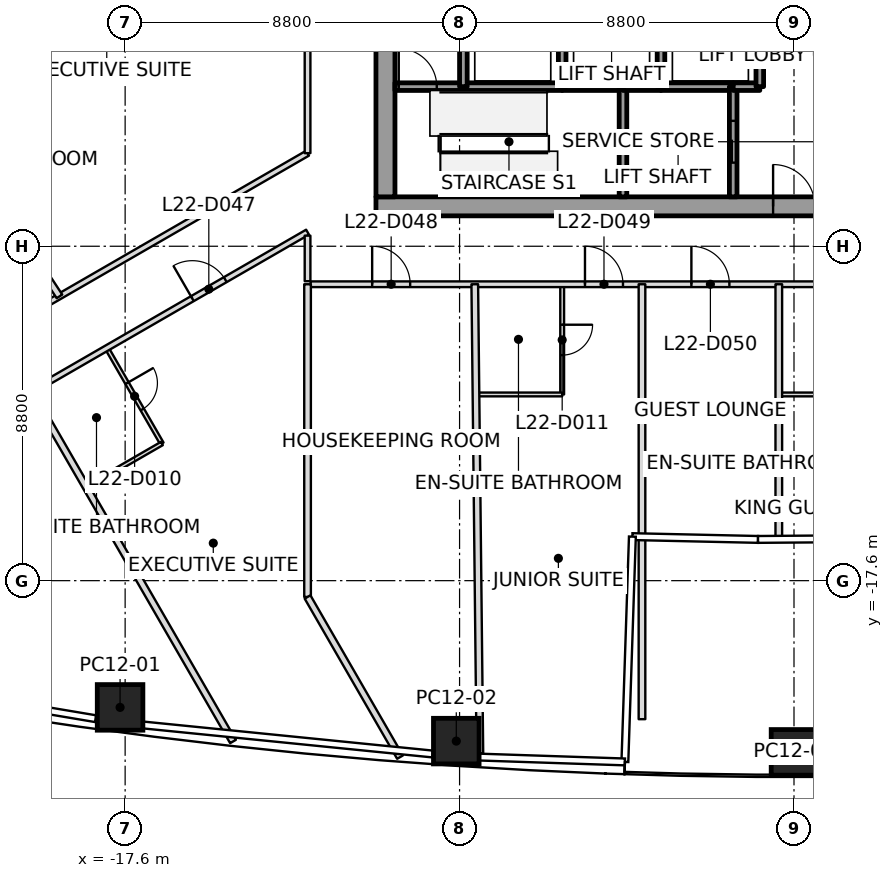
"""IFC4 building model, lengths in metres.
Left out: names, types, materials, properties, quantities, classifications, styles, units other than length and angle.
Written with IfcOpenShell. Run it as: python <this file> out.ifc"""

import sys

from ifc_helpers import new_model, si_unit, direction, frame, frame_2d, origin, origin_2d, place, context, subcontext, project, spatial, rectangle, extrude, clip, halfspace, element, fill, save


model = new_model("IFC4")
c1 = context("Model", 3, precision=1e-05, world=origin(), true_north=direction((0.0, 1.0)))
c2 = subcontext(c1, "Body", "Model", "MODEL_VIEW")
j1 = project(units=[si_unit("LENGTHUNIT", "METRE"), si_unit("PLANEANGLEUNIT", "RADIAN")], contexts=[c1])
p1 = place(None, origin())
s1 = spatial("IfcSite", under=j1, at=p1, CompositionType="ELEMENT")
p2 = place(p1, origin())
s2 = spatial("IfcBuilding", under=s1, at=p2, CompositionType="ELEMENT")
p3 = place(p2, frame((0.0, 0.0, 103.5)))
s3 = spatial("IfcBuildingStorey", under=s2, at=p3, CompositionType="ELEMENT", Elevation=103.5)
p4 = place(p3, frame((-17.733, -20.935, 0.0), z_axis=(0.01919682326, 0.011280607483, 0.999752084205), x_axis=(-0.990948907943, 0.133090565371, 0.017526073608)))
e1 = element("IfcColumn", 1, at=p4, inside=s3, PredefinedType="COLUMN", context=c2, shape_type="SweptSolid", body=[
    clip(extrude(rectangle(XDim=1.2, YDim=1.2, at=origin_2d()), origin(), (0.0, 0.0, 1.0), 3.701), halfspace(frame((0.0, 0.0, 3.698)), False)),
])
p5 = place(p3, frame((-8.886, -21.823, 0.0), z_axis=(0.00963262733, 0.012139749512, 0.999879912276), x_axis=(-0.997734074202, 0.066702624649, 0.008802104381)))
e2 = element("IfcColumn", 2, at=p5, inside=s3, PredefinedType="COLUMN", context=c2, shape_type="SweptSolid", body=[
    clip(extrude(rectangle(XDim=1.2, YDim=1.2, at=origin_2d()), origin(), (0.0, 0.0, 1.0), 3.7), halfspace(frame((0.0, 0.0, 3.698)), False)),
])
p6 = place(p3, frame((0.0, -22.119, 0.0), z_axis=(0.0, 0.012338222751, 0.999923881233), x_axis=(1.0, 0.0, 0.0)))
e3 = element("IfcColumn", 3, at=p6, inside=s3, PredefinedType="COLUMN", context=c2, shape_type="SweptSolid", body=[
    clip(extrude(rectangle(XDim=1.2, YDim=1.2, at=origin_2d()), origin(), (0.0, 0.0, 1.0), 3.7), halfspace(frame((0.0, 0.0, 3.699)), False)),
])
p7 = place(p3, frame((-11.0, -7.75, 0.0), z_axis=(0.0, 0.0, 1.0), x_axis=(1.0, 0.0, 0.0)))
e4 = element("IfcWall", 4, at=p7, inside=s3, PredefinedType="SHEAR", context=c2, shape_type="SweptSolid", body=[
    extrude(rectangle(XDim=22.0, YDim=0.5, at=frame_2d((11.0, 0.0))), origin(), (0.0, 0.0, 1.0), 3.7),
])
p8 = place(p7, frame((10.45, 0.0, 0.0)))
e5 = element("IfcOpeningElement", 5, at=p8, cuts=e4, PredefinedType="OPENING", context=c2, shape_type="SweptSolid", body=[
    extrude(rectangle(XDim=1.1, YDim=2.1, at=frame_2d((0.55, 1.05))), frame((0.0, 0.25, 0.0), z_axis=(0.0, -1.0, 0.0), x_axis=(1.0, 0.0, 0.0)), (0.0, 0.0, 1.0), 0.5),
])
p9 = place(p3, frame((-10.75, -7.5, 0.0), z_axis=(0.0, 0.0, 1.0), x_axis=(0.0, 1.0, 0.0)))
e6 = element("IfcWall", 6, at=p9, inside=s3, PredefinedType="SHEAR", context=c2, shape_type="SweptSolid", body=[
    extrude(rectangle(XDim=15.0, YDim=0.5, at=frame_2d((7.5, 0.0))), origin(), (0.0, 0.0, 1.0), 3.7),
])
p10 = place(p9, frame((6.6, 0.0, 0.0)))
e7 = element("IfcOpeningElement", 7, at=p10, cuts=e6, PredefinedType="OPENING", context=c2, shape_type="SweptSolid", body=[
    extrude(rectangle(XDim=1.8, YDim=2.1, at=frame_2d((0.9, 1.05))), frame((0.0, 0.25, 0.0), z_axis=(0.0, -1.0, 0.0), x_axis=(1.0, 0.0, 0.0)), (0.0, 0.0, 1.0), 0.5),
])
p11 = place(p3, frame((-10.5, -4.6, 0.0), z_axis=(0.0, 0.0, 1.0), x_axis=(1.0, 0.0, 0.0)))
e8 = element("IfcWall", 8, at=p11, inside=s3, PredefinedType="SOLIDWALL", context=c2, shape_type="SweptSolid", body=[
    extrude(rectangle(XDim=1.8, YDim=0.2, at=frame_2d((0.9, 0.0))), origin(), (0.0, 0.0, 1.0), 3.55),
])
p12 = place(p11, frame((0.1, 0.0, 0.0)))
e9 = element("IfcOpeningElement", 9, at=p12, cuts=e8, PredefinedType="OPENING", context=c2, shape_type="SweptSolid", body=[
    extrude(rectangle(XDim=1.0, YDim=2.1, at=frame_2d((0.5, 1.05))), frame((0.0, 0.1, 0.0), z_axis=(0.0, -1.0, 0.0), x_axis=(1.0, 0.0, 0.0)), (0.0, 0.0, 1.0), 0.2),
])
p13 = place(p3, frame((-8.7, -4.6, 0.0), z_axis=(0.0, 0.0, 1.0), x_axis=(1.0, 0.0, 0.0)))
e10 = element("IfcWall", 10, at=p13, inside=s3, PredefinedType="SOLIDWALL", context=c2, shape_type="SweptSolid", body=[
    extrude(rectangle(XDim=2.6, YDim=0.2, at=frame_2d((1.3, 0.0))), origin(), (0.0, 0.0, 1.0), 3.55),
])
p14 = place(p3, frame((-8.7, -4.6, 0.0), z_axis=(0.0, 0.0, 1.0), x_axis=(0.0, 1.0, 0.0)))
e11 = element("IfcWall", 11, at=p14, inside=s3, PredefinedType="SOLIDWALL", context=c2, shape_type="SweptSolid", body=[
    extrude(rectangle(XDim=2.8, YDim=0.2, at=frame_2d((1.4, 0.0))), origin(), (0.0, 0.0, 1.0), 3.55),
])
p15 = place(p3, frame((-6.1, -4.6, 0.0), z_axis=(0.0, 0.0, 1.0), x_axis=(1.0, 0.0, 0.0)))
e12 = element("IfcWall", 12, at=p15, inside=s3, PredefinedType="SOLIDWALL", context=c2, shape_type="SweptSolid", body=[
    extrude(rectangle(XDim=1.6, YDim=0.2, at=frame_2d((0.8, 0.0))), origin(), (0.0, 0.0, 1.0), 3.55),
])
p16 = place(p3, frame((-6.1, -4.6, 0.0), z_axis=(0.0, 0.0, 1.0), x_axis=(0.0, 1.0, 0.0)))
e13 = element("IfcWall", 13, at=p16, inside=s3, PredefinedType="SOLIDWALL", context=c2, shape_type="SweptSolid", body=[
    extrude(rectangle(XDim=2.8, YDim=0.2, at=frame_2d((1.4, 0.0))), origin(), (0.0, 0.0, 1.0), 3.55),
])
p17 = place(p3, frame((-4.5, -4.6, 0.0), z_axis=(0.0, 0.0, 1.0), x_axis=(0.0, -1.0, 0.0)))
e14 = element("IfcWall", 14, at=p17, inside=s3, PredefinedType="SOLIDWALL", context=c2, shape_type="SweptSolid", body=[
    extrude(rectangle(XDim=2.9, YDim=0.2, at=frame_2d((1.45, 0.0))), origin(), (0.0, 0.0, 1.0), 3.55),
])
p18 = place(p3, frame((-4.5, -4.6, 0.0), z_axis=(0.0, 0.0, 1.0), x_axis=(1.0, 0.0, 0.0)))
e15 = element("IfcWall", 15, at=p18, inside=s3, PredefinedType="SOLIDWALL", context=c2, shape_type="SweptSolid", body=[
    extrude(rectangle(XDim=1.0, YDim=0.2, at=frame_2d((0.5, 0.0))), origin(), (0.0, 0.0, 1.0), 3.55),
])
p19 = place(p3, frame((-3.5, -4.6, 0.0), z_axis=(0.0, 0.0, 1.0), x_axis=(1.0, 0.0, 0.0)))
e16 = element("IfcWall", 16, at=p19, inside=s3, PredefinedType="SOLIDWALL", context=c2, shape_type="SweptSolid", body=[
    extrude(rectangle(XDim=1.9, YDim=0.2, at=frame_2d((0.95, 0.0))), origin(), (0.0, 0.0, 1.0), 3.55),
])
p20 = place(p3, frame((-3.5, -4.6, 0.0), z_axis=(0.0, 0.0, 1.0), x_axis=(0.0, 1.0, 0.0)))
e17 = element("IfcWall", 17, at=p20, inside=s3, PredefinedType="SOLIDWALL", context=c2, shape_type="SweptSolid", body=[
    extrude(rectangle(XDim=2.8, YDim=0.2, at=frame_2d((1.4, 0.0))), origin(), (0.0, 0.0, 1.0), 3.55),
])
p21 = place(p3, frame((-1.6, -7.5, 0.0), z_axis=(0.0, 0.0, 1.0), x_axis=(0.0, 1.0, 0.0)))
e18 = element("IfcWall", 18, at=p21, inside=s3, PredefinedType="SOLIDWALL", context=c2, shape_type="SweptSolid", body=[
    extrude(rectangle(XDim=2.9, YDim=0.2, at=frame_2d((1.45, 0.0))), origin(), (0.0, 0.0, 1.0), 3.55),
])
p22 = place(p21, frame((0.9, 0.0, 0.0)))
e19 = element("IfcOpeningElement", 19, at=p22, cuts=e18, PredefinedType="OPENING", context=c2, shape_type="SweptSolid", body=[
    extrude(rectangle(XDim=1.1, YDim=2.1, at=frame_2d((0.55, 1.05))), frame((0.0, 0.1, 0.0), z_axis=(0.0, -1.0, 0.0), x_axis=(1.0, 0.0, 0.0)), (0.0, 0.0, 1.0), 0.2),
])
p23 = place(p3, frame((-1.6, -4.6, 0.0), z_axis=(0.0, 0.0, 1.0), x_axis=(1.0, 0.0, 0.0)))
e20 = element("IfcWall", 20, at=p23, inside=s3, PredefinedType="SOLIDWALL", context=c2, shape_type="SweptSolid", body=[
    extrude(rectangle(XDim=0.7, YDim=0.2, at=frame_2d((0.35, 0.0))), origin(), (0.0, 0.0, 1.0), 3.55),
])
p24 = place(p3, frame((-0.9, -4.6, 0.0), z_axis=(0.0, 0.0, 1.0), x_axis=(0.0, 1.0, 0.0)))
e21 = element("IfcWall", 21, at=p24, inside=s3, PredefinedType="SOLIDWALL", context=c2, shape_type="SweptSolid", body=[
    extrude(rectangle(XDim=2.8, YDim=0.2, at=frame_2d((1.4, 0.0))), origin(), (0.0, 0.0, 1.0), 3.55),
])
p25 = place(p3, frame((-19.328, -10.12, 0.0), z_axis=(0.0, 0.0, 1.0), x_axis=(-0.548041487863, 0.836451150744, 0.0)))
e22 = element("IfcWall", 22, at=p25, inside=s3, PredefinedType="PARTITIONING", context=c2, shape_type="SweptSolid", body=[
    extrude(rectangle(XDim=11.215, YDim=0.175, at=frame_2d((5.608, 0.0))), origin(), (0.0, 0.0, 1.0), 2.934),
])
p26 = place(p3, frame((-14.761, -21.832, 0.0), z_axis=(0.0, 0.0, 1.0), x_axis=(-0.500013467546, 0.866017628154, 0.0)))
e23 = element("IfcWall", 23, at=p26, inside=s3, PredefinedType="PARTITIONING", context=c2, shape_type="SweptSolid", body=[
    extrude(rectangle(XDim=10.627, YDim=0.175, at=frame_2d((5.313, 0.0))), origin(), (0.0, 0.0, 1.0), 2.934),
])
p27 = place(p3, frame((-12.8, -9.8, 0.0), z_axis=(0.0, 0.0, 1.0), x_axis=(0.0, -1.0, 0.0)))
e24 = element("IfcWall", 24, at=p27, inside=s3, PredefinedType="PARTITIONING", context=c2, shape_type="SweptSolid", body=[
    extrude(rectangle(XDim=8.229, YDim=0.175, at=frame_2d((4.115, 0.0))), origin(), (0.0, 0.0, 1.0), 3.15),
])
p28 = place(p3, frame((-12.8, -18.029, 0.0), z_axis=(0.0, 0.0, 1.0), x_axis=(0.500007611576, -0.866021009194, 0.0)))
e25 = element("IfcWall", 25, at=p28, inside=s3, PredefinedType="PARTITIONING", context=c2, shape_type="SweptSolid", body=[
    extrude(rectangle(XDim=4.867, YDim=0.175, at=frame_2d((2.433, 0.0))), origin(), (0.0, 0.0, 1.0), 2.934),
])
p29 = place(p3, frame((-8.265, -22.143, 0.0), z_axis=(0.0, 0.0, 1.0), x_axis=(-0.010897942505, 0.999940615661, 0.0)))
e26 = element("IfcWall", 26, at=p29, inside=s3, PredefinedType="PARTITIONING", context=c2, shape_type="SweptSolid", body=[
    extrude(rectangle(XDim=12.344, YDim=0.175, at=frame_2d((6.172, 0.0))), origin(), (0.0, 0.0, 1.0), 2.934),
])
p30 = place(p3, frame((-4.0, -9.8, 0.0), z_axis=(0.0, 0.0, 1.0), x_axis=(0.0, -1.0, 0.0)))
e27 = element("IfcWall", 27, at=p30, inside=s3, PredefinedType="PARTITIONING", context=c2, shape_type="SweptSolid", body=[
    extrude(rectangle(XDim=11.445, YDim=0.175, at=frame_2d((5.723, 0.0))), origin(), (0.0, 0.0, 1.0), 3.15),
])
p31 = place(p3, frame((-0.4, -16.515, 0.0), z_axis=(0.0, 0.0, 1.0), x_axis=(0.0, 1.0, 0.0)))
e28 = element("IfcWall", 28, at=p31, inside=s3, PredefinedType="PARTITIONING", context=c2, shape_type="SweptSolid", body=[
    extrude(rectangle(XDim=6.715, YDim=0.175, at=frame_2d((3.357, 0.0))), origin(), (0.0, 0.0, 1.0), 3.15),
])
p32 = place(p3, frame((-12.8, -6.351, 0.0), z_axis=(0.0, 0.0, 1.0), x_axis=(-0.866023496323, -0.500003303805, 0.0)))
e29 = element("IfcWall", 29, at=p32, inside=s3, PredefinedType="PARTITIONING", context=c2, shape_type="SweptSolid", body=[
    extrude(rectangle(XDim=11.538, YDim=0.15, at=frame_2d((5.769, 0.0))), origin(), (0.0, 0.0, 1.0), 2.947),
])
p33 = place(p32, frame((10.238, 0.0, 0.0)))
e30 = element("IfcOpeningElement", 30, at=p33, cuts=e29, PredefinedType="OPENING", context=c2, shape_type="SweptSolid", body=[
    extrude(rectangle(XDim=1.0, YDim=2.1, at=frame_2d((0.5, 1.05))), frame((0.0, 0.075, 0.0), z_axis=(0.0, -1.0, 0.0), x_axis=(1.0, 0.0, 0.0)), (0.0, 0.0, 1.0), 0.15),
])
p34 = place(p3, frame((-21.823, -13.639, 0.0), z_axis=(0.0, 0.0, 1.0), x_axis=(0.86602247392, 0.500005074639, 0.0)))
e31 = element("IfcWall", 31, at=p34, inside=s3, PredefinedType="PARTITIONING", context=c2, shape_type="SweptSolid", body=[
    extrude(rectangle(XDim=10.419, YDim=0.15, at=frame_2d((5.209, 0.0))), origin(), (0.0, 0.0, 1.0), 2.797),
])
p35 = place(p34, frame((0.459, 0.0, 0.0)))
e32 = element("IfcOpeningElement", 32, at=p35, cuts=e31, PredefinedType="OPENING", context=c2, shape_type="SweptSolid", body=[
    extrude(rectangle(XDim=1.0, YDim=2.1, at=frame_2d((0.5, 1.05))), frame((0.0, 0.075, 0.0), z_axis=(0.0, -1.0, 0.0), x_axis=(1.0, 0.0, 0.0)), (0.0, 0.0, 1.0), 0.15),
])
p36 = place(p34, frame((6.919, 0.0, 0.0)))
e33 = element("IfcOpeningElement", 33, at=p36, cuts=e31, PredefinedType="OPENING", context=c2, shape_type="SweptSolid", body=[
    extrude(rectangle(XDim=1.0, YDim=2.1, at=frame_2d((0.5, 1.05))), frame((0.0, 0.075, 0.0), z_axis=(0.0, -1.0, 0.0), x_axis=(1.0, 0.0, 0.0)), (0.0, 0.0, 1.0), 0.15),
])
p37 = place(p3, frame((-12.8, -8.521, 0.0), z_axis=(0.0, 0.0, 1.0), x_axis=(0.0, -1.0, 0.0)))
e34 = element("IfcWall", 34, at=p37, inside=s3, PredefinedType="PARTITIONING", context=c2, shape_type="SweptSolid", body=[
    extrude(rectangle(XDim=1.199, YDim=0.15, at=frame_2d((0.6, 0.0))), origin(), (0.0, 0.0, 1.0), 2.797),
])
p38 = place(p3, frame((-12.8, 9.72, 0.0), z_axis=(0.0, 0.0, 1.0), x_axis=(0.0, -1.0, 0.0)))
e35 = element("IfcWall", 35, at=p38, inside=s3, PredefinedType="PARTITIONING", context=c2, shape_type="SweptSolid", body=[
    extrude(rectangle(XDim=16.071, YDim=0.15, at=frame_2d((8.035, 0.0))), origin(), (0.0, 0.0, 1.0), 2.947),
])
p39 = place(p38, frame((3.095, 0.0, 0.0)))
e36 = element("IfcOpeningElement", 36, at=p39, cuts=e35, PredefinedType="OPENING", context=c2, shape_type="SweptSolid", body=[
    extrude(rectangle(XDim=1.0, YDim=2.1, at=frame_2d((0.5, 1.05))), frame((0.0, 0.075, 0.0), z_axis=(0.0, -1.0, 0.0), x_axis=(1.0, 0.0, 0.0)), (0.0, 0.0, 1.0), 0.15),
])
p40 = place(p38, frame((12.371, 0.0, 0.0)))
e37 = element("IfcOpeningElement", 37, at=p40, cuts=e35, PredefinedType="OPENING", context=c2, shape_type="SweptSolid", body=[
    extrude(rectangle(XDim=1.0, YDim=2.1, at=frame_2d((0.5, 1.05))), frame((0.0, 0.075, 0.0), z_axis=(0.0, -1.0, 0.0), x_axis=(1.0, 0.0, 0.0)), (0.0, 0.0, 1.0), 0.15),
])
p41 = place(p3, frame((-12.72, -9.8, 0.0), z_axis=(0.0, 0.0, 1.0), x_axis=(1.0, 0.0, 0.0)))
e38 = element("IfcWall", 38, at=p41, inside=s3, PredefinedType="PARTITIONING", context=c2, shape_type="SweptSolid", body=[
    extrude(rectangle(XDim=25.44, YDim=0.15, at=frame_2d((12.72, 0.0))), origin(), (0.0, 0.0, 1.0), 3.017),
])
p42 = place(p41, frame((1.62, 0.0, 0.0)))
e39 = element("IfcOpeningElement", 39, at=p42, cuts=e38, PredefinedType="OPENING", context=c2, shape_type="SweptSolid", body=[
    extrude(rectangle(XDim=1.0, YDim=2.1, at=frame_2d((0.5, 1.05))), frame((0.0, 0.075, 0.0), z_axis=(0.0, -1.0, 0.0), x_axis=(1.0, 0.0, 0.0)), (0.0, 0.0, 1.0), 0.15),
])
p43 = place(p41, frame((7.22, 0.0, 0.0)))
e40 = element("IfcOpeningElement", 40, at=p43, cuts=e38, PredefinedType="OPENING", context=c2, shape_type="SweptSolid", body=[
    extrude(rectangle(XDim=1.0, YDim=2.1, at=frame_2d((0.5, 1.05))), frame((0.0, 0.075, 0.0), z_axis=(0.0, -1.0, 0.0), x_axis=(1.0, 0.0, 0.0)), (0.0, 0.0, 1.0), 0.15),
])
p44 = place(p41, frame((10.02, 0.0, 0.0)))
e41 = element("IfcOpeningElement", 41, at=p44, cuts=e38, PredefinedType="OPENING", context=c2, shape_type="SweptSolid", body=[
    extrude(rectangle(XDim=1.0, YDim=2.1, at=frame_2d((0.5, 1.05))), frame((0.0, 0.075, 0.0), z_axis=(0.0, -1.0, 0.0), x_axis=(1.0, 0.0, 0.0)), (0.0, 0.0, 1.0), 0.15),
])
p45 = place(p41, frame((15.42, 0.0, 0.0)))
e42 = element("IfcOpeningElement", 42, at=p45, cuts=e38, PredefinedType="OPENING", context=c2, shape_type="SweptSolid", body=[
    extrude(rectangle(XDim=1.0, YDim=2.1, at=frame_2d((0.5, 1.05))), frame((0.0, 0.075, 0.0), z_axis=(0.0, -1.0, 0.0), x_axis=(1.0, 0.0, 0.0)), (0.0, 0.0, 1.0), 0.15),
])
p46 = place(p41, frame((19.82, 0.0, 0.0)))
e43 = element("IfcOpeningElement", 43, at=p46, cuts=e38, PredefinedType="OPENING", context=c2, shape_type="SweptSolid", body=[
    extrude(rectangle(XDim=1.0, YDim=2.1, at=frame_2d((0.5, 1.05))), frame((0.0, 0.075, 0.0), z_axis=(0.0, -1.0, 0.0), x_axis=(1.0, 0.0, 0.0)), (0.0, 0.0, 1.0), 0.15),
])
p47 = place(p3, frame((-18.068, -11.505, 0.0), z_axis=(0.0, 0.0, 1.0), x_axis=(0.500036638401, -0.866004249561, 0.0)))
e44 = element("IfcWall", 44, at=p47, inside=s3, PredefinedType="PARTITIONING", context=c2, shape_type="SweptSolid", body=[
    extrude(rectangle(XDim=2.87, YDim=0.1, at=frame_2d((1.435, 0.0))), origin(), (0.0, 0.0, 1.0), 2.797),
])
p48 = place(p47, frame((1.035, 0.0, 0.0)))
e45 = element("IfcOpeningElement", 45, at=p48, cuts=e44, PredefinedType="OPENING", context=c2, shape_type="SweptSolid", body=[
    extrude(rectangle(XDim=0.8, YDim=2.1, at=frame_2d((0.4, 1.05))), frame((0.0, 0.05, 0.0), z_axis=(0.0, -1.0, 0.0), x_axis=(1.0, 0.0, 0.0)), (0.0, 0.0, 1.0), 0.1),
])
p49 = place(p3, frame((-16.633, -13.991, 0.0), z_axis=(0.0, 0.0, 1.0), x_axis=(-0.866017224141, -0.500014167291, 0.0)))
e46 = element("IfcWall", 46, at=p49, inside=s3, PredefinedType="PARTITIONING", context=c2, shape_type="SweptSolid", body=[
    extrude(rectangle(XDim=2.27, YDim=0.1, at=frame_2d((1.135, 0.0))), origin(), (0.0, 0.0, 1.0), 3.15),
])
p50 = place(p3, frame((-6.1, -9.83, 0.0), z_axis=(0.0, 0.0, 1.0), x_axis=(0.0, -1.0, 0.0)))
e47 = element("IfcWall", 47, at=p50, inside=s3, PredefinedType="PARTITIONING", context=c2, shape_type="SweptSolid", body=[
    extrude(rectangle(XDim=2.87, YDim=0.1, at=frame_2d((1.435, 0.0))), origin(), (0.0, 0.0, 1.0), 3.15),
])
p51 = place(p50, frame((1.035, 0.0, 0.0)))
e48 = element("IfcOpeningElement", 48, at=p51, cuts=e47, PredefinedType="OPENING", context=c2, shape_type="SweptSolid", body=[
    extrude(rectangle(XDim=0.8, YDim=2.1, at=frame_2d((0.4, 1.05))), frame((0.0, 0.05, 0.0), z_axis=(0.0, -1.0, 0.0), x_axis=(1.0, 0.0, 0.0)), (0.0, 0.0, 1.0), 0.1),
])
p52 = place(p3, frame((-6.1, -12.7, 0.0), z_axis=(0.0, 0.0, 1.0), x_axis=(-1.0, 0.0, 0.0)))
e49 = element("IfcWall", 49, at=p52, inside=s3, PredefinedType="PARTITIONING", context=c2, shape_type="SweptSolid", body=[
    extrude(rectangle(XDim=2.27, YDim=0.1, at=frame_2d((1.135, 0.0))), origin(), (0.0, 0.0, 1.0), 3.15),
])
p53 = place(p3, frame((1.9, -12.7, 0.0), z_axis=(0.0, 0.0, 1.0), x_axis=(-1.0, 0.0, 0.0)))
e50 = element("IfcWall", 50, at=p53, inside=s3, PredefinedType="PARTITIONING", context=c2, shape_type="SweptSolid", body=[
    extrude(rectangle(XDim=2.27, YDim=0.1, at=frame_2d((1.135, 0.0))), origin(), (0.0, 0.0, 1.0), 3.017),
])
p54 = place(p36, origin())
e51 = element("IfcDoor", 51, at=p54, inside=s3, OperationType="SINGLE_SWING_LEFT", PredefinedType="DOOR", context=c2, shape_type="SweptSolid", body=[
    extrude(rectangle(XDim=1.0, YDim=2.1, at=frame_2d((0.5, 1.05))), frame((0.0, 0.025, 0.0), z_axis=(0.0, -1.0, 0.0), x_axis=(1.0, 0.0, 0.0)), (0.0, 0.0, 1.0), 0.05),
])
fill(e33, e51)
p55 = place(p48, origin())
e52 = element("IfcDoor", 52, at=p55, inside=s3, OperationType="SINGLE_SWING_LEFT", PredefinedType="DOOR", context=c2, shape_type="SweptSolid", body=[
    extrude(rectangle(XDim=0.8, YDim=2.1, at=frame_2d((0.4, 1.05))), frame((0.0, 0.025, 0.0), z_axis=(0.0, -1.0, 0.0), x_axis=(1.0, 0.0, 0.0)), (0.0, 0.0, 1.0), 0.05),
])
fill(e45, e52)
p56 = place(p42, origin())
e53 = element("IfcDoor", 53, at=p56, inside=s3, OperationType="SINGLE_SWING_LEFT", PredefinedType="DOOR", context=c2, shape_type="SweptSolid", body=[
    extrude(rectangle(XDim=1.0, YDim=2.1, at=frame_2d((0.5, 1.05))), frame((0.0, 0.025, 0.0), z_axis=(0.0, -1.0, 0.0), x_axis=(1.0, 0.0, 0.0)), (0.0, 0.0, 1.0), 0.05),
])
fill(e39, e53)
p57 = place(p43, origin())
e54 = element("IfcDoor", 54, at=p57, inside=s3, OperationType="SINGLE_SWING_LEFT", PredefinedType="DOOR", context=c2, shape_type="SweptSolid", body=[
    extrude(rectangle(XDim=1.0, YDim=2.1, at=frame_2d((0.5, 1.05))), frame((0.0, 0.025, 0.0), z_axis=(0.0, -1.0, 0.0), x_axis=(1.0, 0.0, 0.0)), (0.0, 0.0, 1.0), 0.05),
])
fill(e40, e54)
p58 = place(p51, origin())
e55 = element("IfcDoor", 55, at=p58, inside=s3, OperationType="SINGLE_SWING_LEFT", PredefinedType="DOOR", context=c2, shape_type="SweptSolid", body=[
    extrude(rectangle(XDim=0.8, YDim=2.1, at=frame_2d((0.4, 1.05))), frame((0.0, 0.025, 0.0), z_axis=(0.0, -1.0, 0.0), x_axis=(1.0, 0.0, 0.0)), (0.0, 0.0, 1.0), 0.05),
])
fill(e48, e55)
p59 = place(p44, origin())
e56 = element("IfcDoor", 56, at=p59, inside=s3, OperationType="SINGLE_SWING_LEFT", PredefinedType="DOOR", context=c2, shape_type="SweptSolid", body=[
    extrude(rectangle(XDim=1.0, YDim=2.1, at=frame_2d((0.5, 1.05))), frame((0.0, 0.025, 0.0), z_axis=(0.0, -1.0, 0.0), x_axis=(1.0, 0.0, 0.0)), (0.0, 0.0, 1.0), 0.05),
])
fill(e41, e56)
p60 = place(p22, origin())
e57 = element("IfcDoor", 57, at=p60, inside=s3, OperationType="SLIDING_TO_RIGHT", PredefinedType="DOOR", context=c2, shape_type="SweptSolid", body=[
    extrude(rectangle(XDim=1.1, YDim=2.1, at=frame_2d((0.55, 1.05))), frame((0.0, 0.025, 0.0), z_axis=(0.0, -1.0, 0.0), x_axis=(1.0, 0.0, 0.0)), (0.0, 0.0, 1.0), 0.05),
])
fill(e19, e57)
p61 = place(p12, origin())
e58 = element("IfcDoor", 58, at=p61, inside=s3, OperationType="SINGLE_SWING_LEFT", PredefinedType="DOOR", context=c2, shape_type="SweptSolid", body=[
    extrude(rectangle(XDim=1.0, YDim=2.1, at=frame_2d((0.5, 1.05))), frame((0.0, 0.025, 0.0), z_axis=(0.0, -1.0, 0.0), x_axis=(1.0, 0.0, 0.0)), (0.0, 0.0, 1.0), 0.05),
])
fill(e9, e58)
p62 = place(p8, origin())
e59 = element("IfcDoor", 59, at=p62, inside=s3, OperationType="SINGLE_SWING_LEFT", PredefinedType="DOOR", context=c2, shape_type="SweptSolid", body=[
    extrude(rectangle(XDim=1.1, YDim=2.1, at=frame_2d((0.55, 1.05))), frame((0.0, 0.025, 0.0), z_axis=(0.0, -1.0, 0.0), x_axis=(1.0, 0.0, 0.0)), (0.0, 0.0, 1.0), 0.05),
])
fill(e5, e59)
save(model, sys.argv[1])
